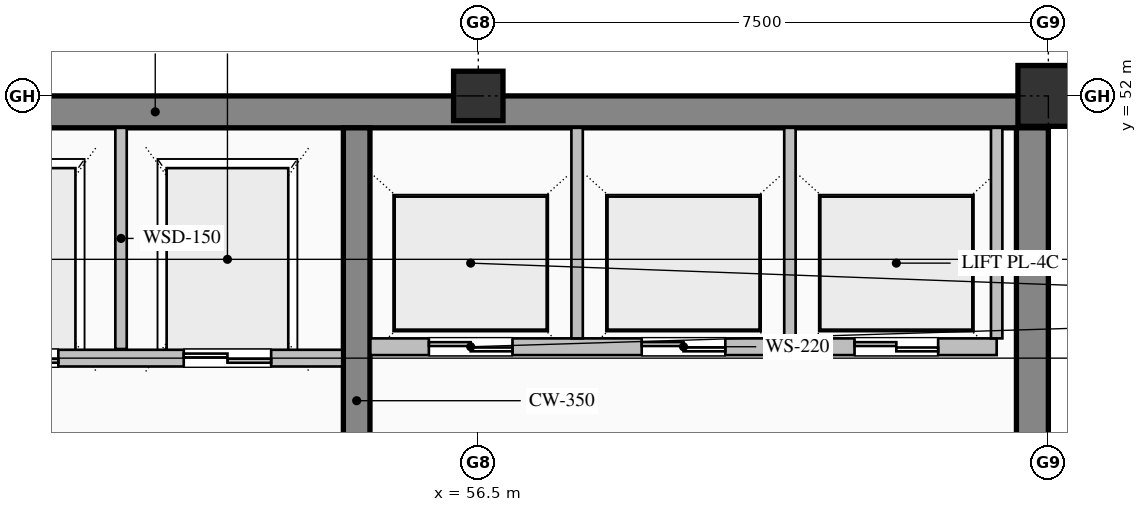
"""IFC4 building model, lengths in metres.
Left out: names, types, materials, properties, quantities, classifications, styles, units other than length and angle.
Written with IfcOpenShell. Run it as: python <this file> out.ifc"""

import sys

from ifc_helpers import new_model, si_unit, direction, frame, frame_2d, origin, origin_2d, place, context, subcontext, project, spatial, rectangle, hollow_rectangle, extrude, element, fill, save


model = new_model("IFC4")
c1 = context("Model", 3, precision=1e-05, world=origin(), true_north=direction((0.0, 1.0)))
c2 = subcontext(c1, "Body", "Model", "MODEL_VIEW")
j1 = project(units=[si_unit("LENGTHUNIT", "METRE"), si_unit("PLANEANGLEUNIT", "RADIAN")], contexts=[c1])
p1 = place(None, origin())
s1 = spatial("IfcSite", under=j1, at=p1, CompositionType="ELEMENT")
p2 = place(p1, origin())
s2 = spatial("IfcBuilding", under=s1, at=p2, CompositionType="ELEMENT")
p3 = place(p2, frame((0.0, 0.0, 295.2)))
s3 = spatial("IfcBuildingStorey", under=s2, at=p3, CompositionType="ELEMENT", Elevation=295.2)
p4 = place(p3, frame((40.5, 51.79, 0.0), z_axis=(0.0, 0.0, 1.0), x_axis=(1.0, 0.0, 0.0)))
e1 = element("IfcWall", 1, at=p4, inside=s3, PredefinedType="SHEAR", context=c2, shape_type="SweptSolid", body=[
    extrude(rectangle(XDim=23.5, YDim=0.42, at=frame_2d((11.75, 0.0))), origin(), (0.0, 0.0, 1.0), 3.785),
])
p5 = place(p3, frame((63.79, 36.32, 0.0), z_axis=(0.0, 0.0, 1.0), x_axis=(0.0, 1.0, 0.0)))
e2 = element("IfcWall", 2, at=p5, inside=s3, PredefinedType="SHEAR", context=c2, shape_type="SweptSolid", body=[
    extrude(rectangle(XDim=15.26, YDim=0.42, at=frame_2d((7.63, 0.0))), origin(), (0.0, 0.0, 1.0), 3.785),
])
p6 = place(p3, frame((54.9, 44.4, 0.0), z_axis=(0.0, 0.0, 1.0), x_axis=(0.0, 1.0, 0.0)))
e3 = element("IfcWall", 3, at=p6, inside=s3, PredefinedType="SHEAR", context=c2, shape_type="SweptSolid", body=[
    extrude(rectangle(XDim=7.18, YDim=0.35, at=frame_2d((3.59, 0.0))), origin(), (0.0, 0.0, 1.0), 3.785),
])
p7 = place(p3, frame((56.5, 52.0, 0.0), z_axis=(0.0, 0.0, 1.0), x_axis=(1.0, 0.0, 0.0)))
e4 = element("IfcColumn", 4, at=p7, inside=s3, PredefinedType="COLUMN", context=c2, shape_type="SweptSolid", body=[
    extrude(hollow_rectangle(XDim=0.65, YDim=0.65, WallThickness=0.028, at=origin_2d()), origin(), (0.0, 0.0, 1.0), 4.0),
])
p8 = place(p3, frame((64.0, 52.0, 0.0), z_axis=(0.0, 0.0, 1.0), x_axis=(1.0, 0.0, 0.0)))
e5 = element("IfcColumn", 5, at=p8, inside=s3, PredefinedType="COLUMN", context=c2, shape_type="SweptSolid", body=[
    extrude(hollow_rectangle(XDim=0.8, YDim=0.8, WallThickness=0.032, at=origin_2d()), origin(), (0.0, 0.0, 1.0), 4.0),
])
p9 = place(p3, frame((54.71, 48.55, 0.0), z_axis=(0.0, 0.0, 1.0), x_axis=(-1.0, 0.0, 0.0)))
e6 = element("IfcWall", 6, at=p9, inside=s3, PredefinedType="PARTITIONING", context=c2, shape_type="SweptSolid", body=[
    extrude(rectangle(XDim=5.12, YDim=0.22, at=frame_2d((2.56, 0.0))), origin(), (0.0, 0.0, 1.0), 3.785),
])
p10 = place(p9, frame((3.735, 0.0, 0.0)))
e7 = element("IfcOpeningElement", 7, at=p10, cuts=e6, PredefinedType="OPENING", context=c2, shape_type="SweptSolid", body=[
    extrude(rectangle(XDim=1.15, YDim=2.2, at=frame_2d((0.575, 1.1))), frame((0.0, 0.12, 0.0), z_axis=(0.0, -1.0, 0.0), x_axis=(1.0, 0.0, 0.0)), (0.0, 0.0, 1.0), 0.24),
])
p11 = place(p9, frame((0.935, 0.0, 0.0)))
e8 = element("IfcOpeningElement", 8, at=p11, cuts=e6, PredefinedType="OPENING", context=c2, shape_type="SweptSolid", body=[
    extrude(rectangle(XDim=1.15, YDim=2.2, at=frame_2d((0.575, 1.1))), frame((0.0, 0.12, 0.0), z_axis=(0.0, -1.0, 0.0), x_axis=(1.0, 0.0, 0.0)), (0.0, 0.0, 1.0), 0.24),
])
p12 = place(p3, frame((51.8, 48.67, 0.0), z_axis=(0.0, 0.0, 1.0), x_axis=(0.0, 1.0, 0.0)))
e9 = element("IfcWall", 9, at=p12, inside=s3, PredefinedType="PARTITIONING", context=c2, shape_type="SweptSolid", body=[
    extrude(rectangle(XDim=2.91, YDim=0.15, at=frame_2d((1.455, 0.0))), origin(), (0.0, 0.0, 1.0), 3.785),
])
p13 = place(p3, frame((63.32, 48.7, 0.0), z_axis=(0.0, 0.0, 1.0), x_axis=(-1.0, 0.0, 0.0)))
e10 = element("IfcWall", 10, at=p13, inside=s3, PredefinedType="PARTITIONING", context=c2, shape_type="SweptSolid", body=[
    extrude(rectangle(XDim=8.24, YDim=0.22, at=frame_2d((4.12, 0.0))), origin(), (0.0, 0.0, 1.0), 3.785),
])
p14 = place(p13, frame((6.37, 0.0, 0.0)))
e11 = element("IfcOpeningElement", 11, at=p14, cuts=e10, PredefinedType="OPENING", context=c2, shape_type="SweptSolid", body=[
    extrude(rectangle(XDim=1.1, YDim=2.2, at=frame_2d((0.55, 1.1))), frame((0.0, 0.12, 0.0), z_axis=(0.0, -1.0, 0.0), x_axis=(1.0, 0.0, 0.0)), (0.0, 0.0, 1.0), 0.24),
])
p15 = place(p13, frame((3.57, 0.0, 0.0)))
e12 = element("IfcOpeningElement", 12, at=p15, cuts=e10, PredefinedType="OPENING", context=c2, shape_type="SweptSolid", body=[
    extrude(rectangle(XDim=1.1, YDim=2.2, at=frame_2d((0.55, 1.1))), frame((0.0, 0.12, 0.0), z_axis=(0.0, -1.0, 0.0), x_axis=(1.0, 0.0, 0.0)), (0.0, 0.0, 1.0), 0.24),
])
p16 = place(p13, frame((0.77, 0.0, 0.0)))
e13 = element("IfcOpeningElement", 13, at=p16, cuts=e10, PredefinedType="OPENING", context=c2, shape_type="SweptSolid", body=[
    extrude(rectangle(XDim=1.1, YDim=2.2, at=frame_2d((0.55, 1.1))), frame((0.0, 0.12, 0.0), z_axis=(0.0, -1.0, 0.0), x_axis=(1.0, 0.0, 0.0)), (0.0, 0.0, 1.0), 0.24),
])
for number, where, z_axis, x_axis in (
    (14, (57.8, 48.81, 0.0), (0.0, 0.0, 1.0), (0.0, 1.0, 0.0)),
    (15, (60.6, 48.81, 0.0), (0.0, 0.0, 1.0), (0.0, 1.0, 0.0)),
    (16, (63.32, 48.81, 0.0), (0.0, 0.0, 1.0), (0.0, 1.0, 0.0)),
):
    element("IfcWall", number, at=place(p3, frame(where, z_axis=z_axis, x_axis=x_axis)), inside=s3, PredefinedType="PARTITIONING", context=c2, shape_type="SweptSolid", body=[
        extrude(rectangle(XDim=2.77, YDim=0.15, at=frame_2d((1.385, 0.0))), origin(), (0.0, 0.0, 1.0), 3.785),
    ])
p17 = place(p10, origin())
e17 = element("IfcDoor", 17, at=p17, inside=s3, OperationType="DOUBLE_DOOR_SLIDING", PredefinedType="DOOR", context=c2, shape_type="SweptSolid", body=[
    extrude(rectangle(XDim=1.15, YDim=2.2, at=frame_2d((0.575, 1.1))), frame((0.0, 0.025, 0.0), z_axis=(0.0, -1.0, 0.0), x_axis=(1.0, 0.0, 0.0)), (0.0, 0.0, 1.0), 0.05),
])
fill(e7, e17)
p18 = place(p11, origin())
e18 = element("IfcDoor", 18, at=p18, inside=s3, OperationType="DOUBLE_DOOR_SLIDING", PredefinedType="DOOR", context=c2, shape_type="SweptSolid", body=[
    extrude(rectangle(XDim=1.15, YDim=2.2, at=frame_2d((0.575, 1.1))), frame((0.0, 0.025, 0.0), z_axis=(0.0, -1.0, 0.0), x_axis=(1.0, 0.0, 0.0)), (0.0, 0.0, 1.0), 0.05),
])
fill(e8, e18)
p19 = place(p14, origin())
e19 = element("IfcDoor", 19, at=p19, inside=s3, OperationType="DOUBLE_DOOR_SLIDING", PredefinedType="DOOR", context=c2, shape_type="SweptSolid", body=[
    extrude(rectangle(XDim=1.1, YDim=2.2, at=frame_2d((0.55, 1.1))), frame((0.0, 0.025, 0.0), z_axis=(0.0, -1.0, 0.0), x_axis=(1.0, 0.0, 0.0)), (0.0, 0.0, 1.0), 0.05),
])
fill(e11, e19)
p20 = place(p15, origin())
e20 = element("IfcDoor", 20, at=p20, inside=s3, OperationType="DOUBLE_DOOR_SLIDING", PredefinedType="DOOR", context=c2, shape_type="SweptSolid", body=[
    extrude(rectangle(XDim=1.1, YDim=2.2, at=frame_2d((0.55, 1.1))), frame((0.0, 0.025, 0.0), z_axis=(0.0, -1.0, 0.0), x_axis=(1.0, 0.0, 0.0)), (0.0, 0.0, 1.0), 0.05),
])
fill(e12, e20)
p21 = place(p16, origin())
e21 = element("IfcDoor", 21, at=p21, inside=s3, OperationType="DOUBLE_DOOR_SLIDING", PredefinedType="DOOR", context=c2, shape_type="SweptSolid", body=[
    extrude(rectangle(XDim=1.1, YDim=2.2, at=frame_2d((0.55, 1.1))), frame((0.0, 0.025, 0.0), z_axis=(0.0, -1.0, 0.0), x_axis=(1.0, 0.0, 0.0)), (0.0, 0.0, 1.0), 0.05),
])
fill(e13, e21)
save(model, sys.argv[1])
